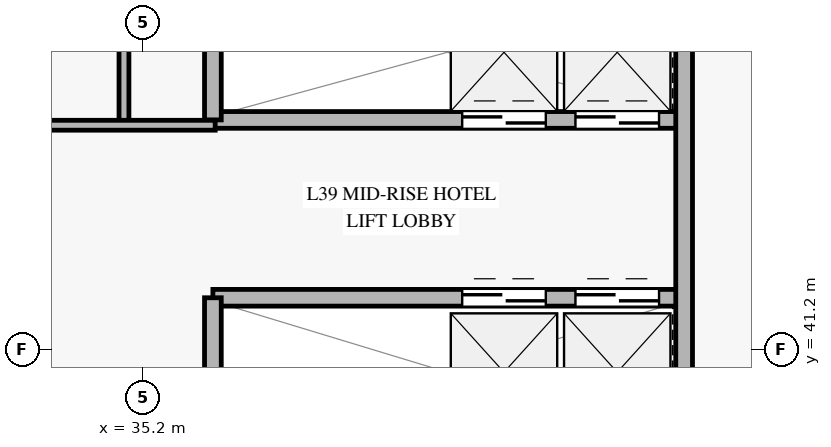
"""IFC4 building model, lengths in metres.
Left out: names, types, materials, properties, quantities, classifications, styles, units other than length and angle.
Written with IfcOpenShell. Run it as: python <this file> out.ifc"""

import sys

from ifc_helpers import new_model, si_unit, direction, frame, frame_2d, origin, place, context, subcontext, project, spatial, rectangle, extrude, source, transform, mapped, element, fill, save


model = new_model("IFC4")
c1 = context("Model", 3, precision=1e-05, world=origin(), true_north=direction((0.0, 1.0)))
c2 = subcontext(c1, "Body", "Model", "MODEL_VIEW")
j1 = project(units=[si_unit("LENGTHUNIT", "METRE"), si_unit("PLANEANGLEUNIT", "RADIAN")], contexts=[c1])
p1 = place(None, origin())
s1 = spatial("IfcSite", under=j1, at=p1, CompositionType="ELEMENT")
p2 = place(p1, origin())
s2 = spatial("IfcBuilding", under=s1, at=p2, CompositionType="ELEMENT")
p3 = place(p2, frame((0.0, 0.0, 159.7)))
s3 = spatial("IfcBuildingStorey", under=s2, at=p3, CompositionType="ELEMENT", Elevation=159.7)
p4 = place(p3, frame((36.12, 44.22, 0.0), z_axis=(0.0, 0.0, 1.0), x_axis=(1.0, 0.0, 0.0)))
e1 = element("IfcWall", 1, at=p4, inside=s3, PredefinedType="SOLIDWALL", context=c2, shape_type="SweptSolid", body=[
    extrude(rectangle(XDim=6.2, YDim=0.22, at=frame_2d((3.1, 0.0))), origin(), (0.0, 0.0, 1.0), 3.27),
])
p5 = place(p4, frame((3.28, 0.0, 0.0)))
e2 = element("IfcOpeningElement", 2, at=p5, cuts=e1, PredefinedType="OPENING", context=c2, shape_type="SweptSolid", body=[
    extrude(rectangle(XDim=1.1, YDim=2.2, at=frame_2d((0.55, 1.1))), frame((0.0, 0.12, 0.0), z_axis=(0.0, -1.0, 0.0), x_axis=(1.0, 0.0, 0.0)), (0.0, 0.0, 1.0), 0.24),
])
p6 = place(p4, frame((4.77, 0.0, 0.0)))
e3 = element("IfcOpeningElement", 3, at=p6, cuts=e1, PredefinedType="OPENING", context=c2, shape_type="SweptSolid", body=[
    extrude(rectangle(XDim=1.1, YDim=2.2, at=frame_2d((0.55, 1.1))), frame((0.0, 0.12, 0.0), z_axis=(0.0, -1.0, 0.0), x_axis=(1.0, 0.0, 0.0)), (0.0, 0.0, 1.0), 0.24),
])
p7 = place(p3, frame((36.12, 41.88, 0.0), z_axis=(0.0, 0.0, 1.0), x_axis=(1.0, 0.0, 0.0)))
e4 = element("IfcWall", 4, at=p7, inside=s3, PredefinedType="SOLIDWALL", context=c2, shape_type="SweptSolid", body=[
    extrude(rectangle(XDim=6.2, YDim=0.22, at=frame_2d((3.1, 0.0))), origin(), (0.0, 0.0, 1.0), 3.27),
])
p8 = place(p7, frame((3.28, 0.0, 0.0)))
e5 = element("IfcOpeningElement", 5, at=p8, cuts=e4, PredefinedType="OPENING", context=c2, shape_type="SweptSolid", body=[
    extrude(rectangle(XDim=1.1, YDim=2.2, at=frame_2d((0.55, 1.1))), frame((0.0, 0.12, 0.0), z_axis=(0.0, -1.0, 0.0), x_axis=(1.0, 0.0, 0.0)), (0.0, 0.0, 1.0), 0.24),
])
p9 = place(p7, frame((4.77, 0.0, 0.0)))
e6 = element("IfcOpeningElement", 6, at=p9, cuts=e4, PredefinedType="OPENING", context=c2, shape_type="SweptSolid", body=[
    extrude(rectangle(XDim=1.1, YDim=2.2, at=frame_2d((0.55, 1.1))), frame((0.0, 0.12, 0.0), z_axis=(0.0, -1.0, 0.0), x_axis=(1.0, 0.0, 0.0)), (0.0, 0.0, 1.0), 0.24),
])
p10 = place(p3, frame((42.32, 39.92, 0.0), z_axis=(0.0, 0.0, 1.0), x_axis=(0.0, 1.0, 0.0)))
e7 = element("IfcWall", 7, at=p10, inside=s3, PredefinedType="SOLIDWALL", context=c2, shape_type="SweptSolid", body=[
    extrude(rectangle(XDim=6.4, YDim=0.22, at=frame_2d((3.2, 0.0))), origin(), (0.0, 0.0, 1.0), 3.27),
])
p11 = place(p3, frame((36.12, 39.92, 0.0), z_axis=(0.0, 0.0, 1.0), x_axis=(0.0, 1.0, 0.0)))
e8 = element("IfcWall", 8, at=p11, inside=s3, PredefinedType="SOLIDWALL", context=c2, shape_type="SweptSolid", body=[
    extrude(rectangle(XDim=1.96, YDim=0.22, at=frame_2d((0.98, 0.0))), origin(), (0.0, 0.0, 1.0), 3.27),
])
p12 = place(p3, frame((36.12, 44.22, 0.0), z_axis=(0.0, 0.0, 1.0), x_axis=(0.0, 1.0, 0.0)))
e9 = element("IfcWall", 9, at=p12, inside=s3, PredefinedType="SOLIDWALL", context=c2, shape_type="SweptSolid", body=[
    extrude(rectangle(XDim=2.1, YDim=0.22, at=frame_2d((1.05, 0.0))), origin(), (0.0, 0.0, 1.0), 3.27),
])
p13 = place(p3, frame((34.95, 44.15, 0.0), z_axis=(0.0, 0.0, 1.0), x_axis=(0.0, 1.0, 0.0)))
e10 = element("IfcWall", 10, at=p13, inside=s3, PredefinedType="PARTITIONING", context=c2, shape_type="SweptSolid", body=[
    extrude(rectangle(XDim=2.17, YDim=0.13, at=frame_2d((1.085, 0.0))), origin(), (0.0, 0.0, 1.0), 3.27),
])
p14 = place(p3, frame((33.18, 44.15, 0.0), z_axis=(0.0, 0.0, 1.0), x_axis=(1.0, 0.0, 0.0)))
e11 = element("IfcWall", 11, at=p14, inside=s3, PredefinedType="PARTITIONING", context=c2, shape_type="SweptSolid", body=[
    extrude(rectangle(XDim=2.97, YDim=0.13, at=frame_2d((1.485, 0.0))), origin(), (0.0, 0.0, 1.0), 2.555),
])
m1 = source(origin(), c2, "Body", "SweptSolid", [
    extrude(rectangle(XDim=1.1, YDim=2.2, at=frame_2d((0.55, 1.1))), frame((0.0, 0.025, 0.0), z_axis=(0.0, -1.0, 0.0), x_axis=(1.0, 0.0, 0.0)), (0.0, 0.0, 1.0), 0.05),
])
p15 = place(p5, origin())
e12 = element("IfcDoor", 12, at=p15, inside=s3, OperationType="SLIDING_TO_LEFT", PredefinedType="DOOR", context=c2, shape_type="MappedRepresentation", body=[
    mapped(m1, transform((0.0, 0.0, 0.0), x_axis=(1.0, 0.0, 0.0), y_axis=(0.0, 1.0, 0.0), z_axis=(0.0, 0.0, 1.0), scale=1.0)),
])
fill(e2, e12)
p16 = place(p6, origin())
e13 = element("IfcDoor", 13, at=p16, inside=s3, OperationType="SLIDING_TO_LEFT", PredefinedType="DOOR", context=c2, shape_type="MappedRepresentation", body=[
    mapped(m1, transform((0.0, 0.0, 0.0), x_axis=(1.0, 0.0, 0.0), y_axis=(0.0, 1.0, 0.0), z_axis=(0.0, 0.0, 1.0), scale=1.0)),
])
fill(e3, e13)
p17 = place(p8, origin())
e14 = element("IfcDoor", 14, at=p17, inside=s3, OperationType="SLIDING_TO_LEFT", PredefinedType="DOOR", context=c2, shape_type="MappedRepresentation", body=[
    mapped(m1, transform((0.0, 0.0, 0.0), x_axis=(1.0, 0.0, 0.0), y_axis=(0.0, 1.0, 0.0), z_axis=(0.0, 0.0, 1.0), scale=1.0)),
])
fill(e5, e14)
p18 = place(p9, origin())
e15 = element("IfcDoor", 15, at=p18, inside=s3, OperationType="SLIDING_TO_LEFT", PredefinedType="DOOR", context=c2, shape_type="MappedRepresentation", body=[
    mapped(m1, transform((0.0, 0.0, 0.0), x_axis=(1.0, 0.0, 0.0), y_axis=(0.0, 1.0, 0.0), z_axis=(0.0, 0.0, 1.0), scale=1.0)),
])
fill(e6, e15)
save(model, sys.argv[1])
